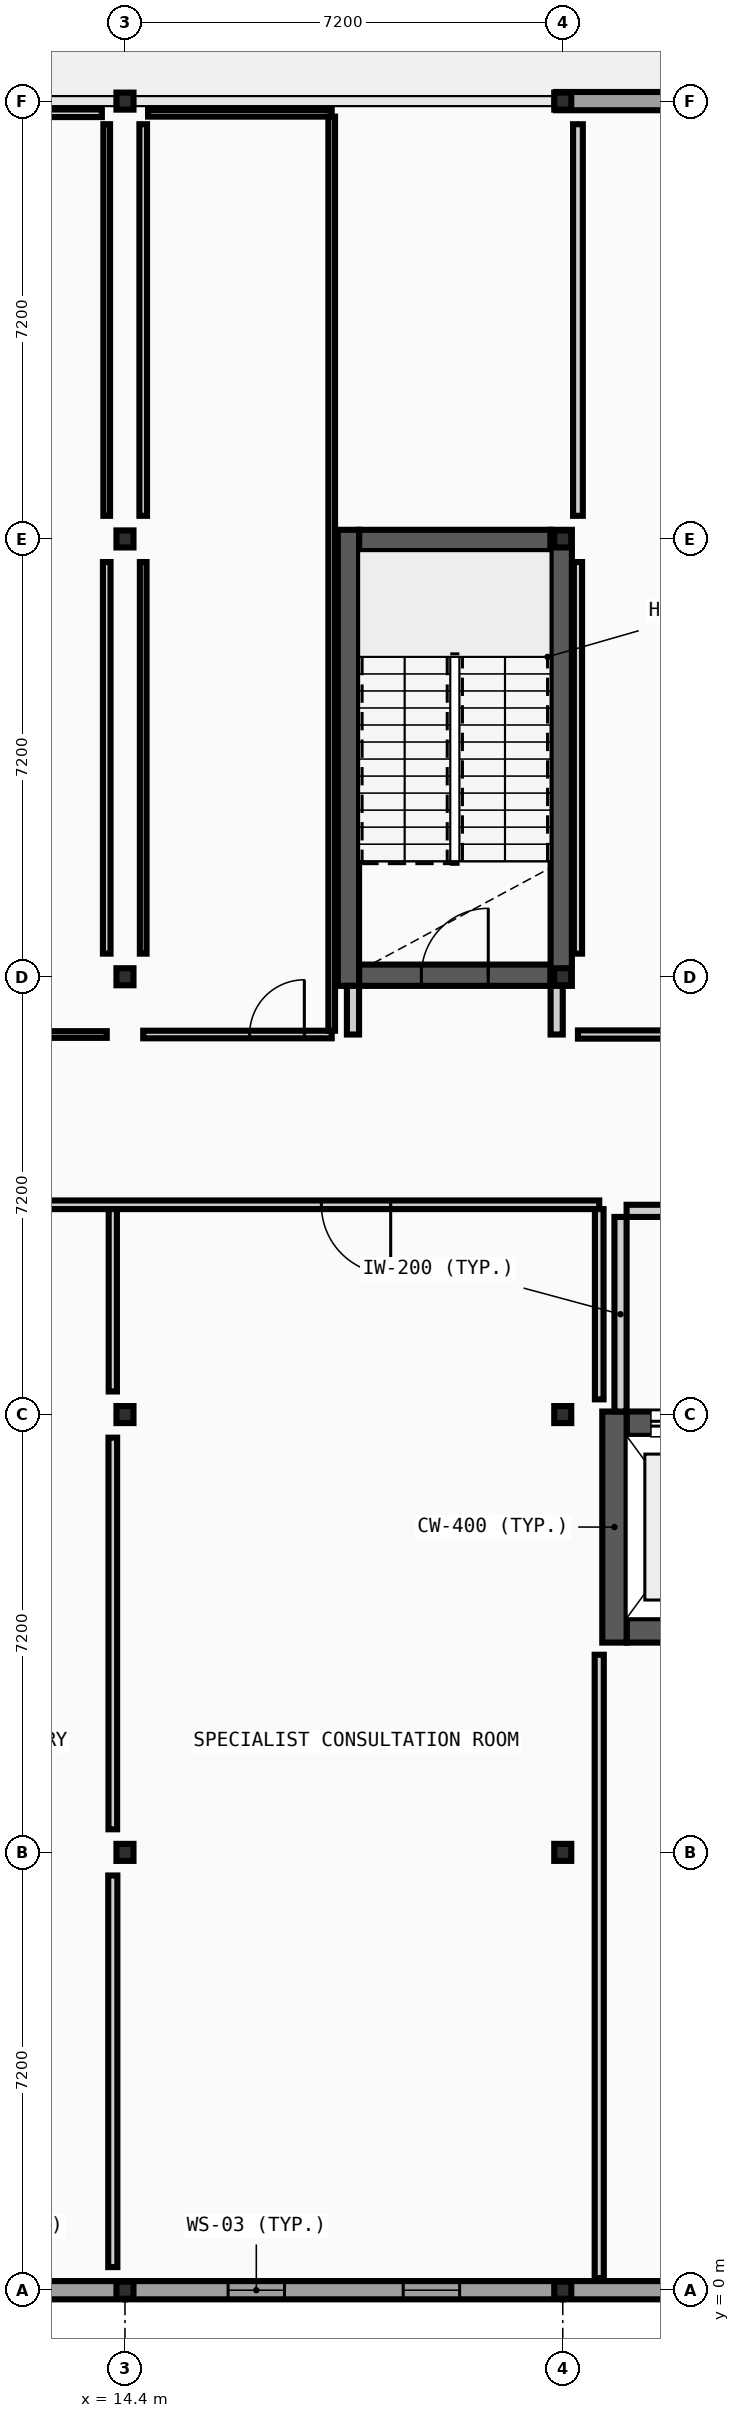
"""IFC4 building model, lengths in metres.
Left out: names, types, materials, properties, quantities, classifications, styles, units other than length and angle.
Written with IfcOpenShell. Run it as: python <this file> out.ifc"""

import sys

from ifc_helpers import new_model, si_unit, direction, frame, frame_2d, origin, origin_2d, place, context, subcontext, project, spatial, rectangle, i_section, extrude, element, fill, save


model = new_model("IFC4")
c1 = context("Model", 3, precision=1e-05, world=origin(), true_north=direction((0.0, 1.0)))
c2 = subcontext(c1, "Body", "Model", "MODEL_VIEW")
j1 = project(units=[si_unit("LENGTHUNIT", "METRE"), si_unit("PLANEANGLEUNIT", "RADIAN")], contexts=[c1])
p1 = place(None, origin())
s1 = spatial("IfcSite", under=j1, at=p1, CompositionType="ELEMENT")
p2 = place(p1, origin())
s2 = spatial("IfcBuilding", under=s1, at=p2, CompositionType="ELEMENT")
p3 = place(p2, frame((0.0, 0.0, 27.2)))
s3 = spatial("IfcBuildingStorey", under=s2, at=p3, CompositionType="ELEMENT", Elevation=27.2)
for number, where, z_axis, x_axis in (
    (1, (14.4, 0.0, 0.0), (0.0, 0.0, 1.0), (1.0, 0.0, 0.0)),
    (2, (14.4, 7.2, 0.0), (0.0, 0.0, 1.0), (1.0, 0.0, 0.0)),
    (3, (14.4, 14.4, 0.0), (0.0, 0.0, 1.0), (1.0, 0.0, 0.0)),
    (4, (14.4, 21.6, 0.0), (0.0, 0.0, 1.0), (1.0, 0.0, 0.0)),
    (5, (14.4, 28.8, 0.0), (0.0, 0.0, 1.0), (1.0, 0.0, 0.0)),
    (6, (14.4, 36.0, 0.0), (0.0, 0.0, 1.0), (1.0, 0.0, 0.0)),
    (7, (21.6, 0.0, 0.0), (0.0, 0.0, 1.0), (1.0, 0.0, 0.0)),
    (8, (21.6, 7.2, 0.0), (0.0, 0.0, 1.0), (1.0, 0.0, 0.0)),
    (9, (21.6, 14.4, 0.0), (0.0, 0.0, 1.0), (1.0, 0.0, 0.0)),
    (10, (21.6, 21.6, 0.0), (0.0, 0.0, 1.0), (1.0, 0.0, 0.0)),
    (11, (21.6, 28.8, 0.0), (0.0, 0.0, 1.0), (1.0, 0.0, 0.0)),
    (12, (21.6, 36.0, 0.0), (0.0, 0.0, 1.0), (1.0, 0.0, 0.0)),
):
    element("IfcColumn", number, at=place(p3, frame(where, z_axis=z_axis, x_axis=x_axis)), inside=s3, PredefinedType="COLUMN", context=c2, shape_type="SweptSolid", body=[
        extrude(i_section(OverallWidth=0.28, OverallDepth=0.28, WebThickness=0.01, FlangeThickness=0.018, FilletRadius=0.024, at=origin_2d()), origin(), (0.0, 0.0, 1.0), 4.4),
    ])
p4 = place(p3, frame((7.2, 0.0, 0.0), z_axis=(0.0, 0.0, 1.0), x_axis=(1.0, 0.0, 0.0)))
e13 = element("IfcWall", 13, at=p4, inside=s3, PredefinedType="STANDARD", context=c2, shape_type="SweptSolid", body=[
    extrude(rectangle(XDim=7.2, YDim=0.3, at=frame_2d((3.6, 0.0))), origin(), (0.0, 0.0, 1.0), 4.035),
])
p5 = place(p4, frame((4.593, 0.0, 0.95)))
e14 = element("IfcOpeningElement", 14, at=p5, cuts=e13, PredefinedType="OPENING", context=c2, shape_type="SweptSolid", body=[
    extrude(rectangle(XDim=0.894, YDim=1.26, at=frame_2d((0.447, 0.63))), frame((0.0, 0.16, 0.0), z_axis=(0.0, -1.0, 0.0), x_axis=(1.0, 0.0, 0.0)), (0.0, 0.0, 1.0), 0.32),
])
p6 = place(p3, frame((14.4, 0.0, 0.0), z_axis=(0.0, 0.0, 1.0), x_axis=(1.0, 0.0, 0.0)))
e15 = element("IfcWall", 15, at=p6, inside=s3, PredefinedType="STANDARD", context=c2, shape_type="SweptSolid", body=[
    extrude(rectangle(XDim=7.2, YDim=0.3, at=frame_2d((3.6, 0.0))), origin(), (0.0, 0.0, 1.0), 4.035),
])
p7 = place(p6, frame((1.696, 0.0, 0.95)))
e16 = element("IfcOpeningElement", 16, at=p7, cuts=e15, PredefinedType="OPENING", context=c2, shape_type="SweptSolid", body=[
    extrude(rectangle(XDim=0.928, YDim=1.26, at=frame_2d((0.464, 0.63))), frame((0.0, 0.16, 0.0), z_axis=(0.0, -1.0, 0.0), x_axis=(1.0, 0.0, 0.0)), (0.0, 0.0, 1.0), 0.32),
])
p8 = place(p6, frame((4.576, 0.0, 0.95)))
e17 = element("IfcOpeningElement", 17, at=p8, cuts=e15, PredefinedType="OPENING", context=c2, shape_type="SweptSolid", body=[
    extrude(rectangle(XDim=0.928, YDim=1.26, at=frame_2d((0.464, 0.63))), frame((0.0, 0.16, 0.0), z_axis=(0.0, -1.0, 0.0), x_axis=(1.0, 0.0, 0.0)), (0.0, 0.0, 1.0), 0.32),
])
p9 = place(p3, frame((21.6, 0.0, 0.0), z_axis=(0.0, 0.0, 1.0), x_axis=(1.0, 0.0, 0.0)))
e18 = element("IfcWall", 18, at=p9, inside=s3, PredefinedType="STANDARD", context=c2, shape_type="SweptSolid", body=[
    extrude(rectangle(XDim=7.05, YDim=0.3, at=frame_2d((3.525, 0.0))), origin(), (0.0, 0.0, 1.0), 4.035),
])
p10 = place(p9, frame((1.634, 0.0, 0.95)))
e19 = element("IfcOpeningElement", 19, at=p10, cuts=e18, PredefinedType="OPENING", context=c2, shape_type="SweptSolid", body=[
    extrude(rectangle(XDim=0.962, YDim=1.26, at=frame_2d((0.481, 0.63))), frame((0.0, 0.16, 0.0), z_axis=(0.0, -1.0, 0.0), x_axis=(1.0, 0.0, 0.0)), (0.0, 0.0, 1.0), 0.32),
])
p11 = place(p9, frame((4.454, 0.0, 0.95)))
e20 = element("IfcOpeningElement", 20, at=p11, cuts=e18, PredefinedType="OPENING", context=c2, shape_type="SweptSolid", body=[
    extrude(rectangle(XDim=0.962, YDim=1.26, at=frame_2d((0.481, 0.63))), frame((0.0, 0.16, 0.0), z_axis=(0.0, -1.0, 0.0), x_axis=(1.0, 0.0, 0.0)), (0.0, 0.0, 1.0), 0.32),
])
p12 = place(p3, frame((28.8, 36.0, 0.0), z_axis=(0.0, 0.0, 1.0), x_axis=(-1.0, 0.0, 0.0)))
e21 = element("IfcWall", 21, at=p12, inside=s3, PredefinedType="STANDARD", context=c2, shape_type="SweptSolid", body=[
    extrude(rectangle(XDim=7.31, YDim=0.3, at=frame_2d((3.655, 0.0))), origin(), (0.0, 0.0, 1.0), 4.035),
])
p13 = place(p12, frame((1.062, 0.0, 0.0)))
e22 = element("IfcOpeningElement", 22, at=p13, cuts=e21, PredefinedType="OPENING", context=c2, shape_type="SweptSolid", body=[
    extrude(rectangle(XDim=1.6, YDim=2.2, at=frame_2d((0.8, 1.1))), frame((0.0, 0.16, 0.0), z_axis=(0.0, -1.0, 0.0), x_axis=(1.0, 0.0, 0.0)), (0.0, 0.0, 1.0), 0.32),
])
p14 = place(p3, frame((22.65, 10.85, 0.0), z_axis=(0.0, 0.0, 1.0), x_axis=(1.0, 0.0, 0.0)))
e23 = element("IfcWall", 23, at=p14, inside=s3, PredefinedType="SHEAR", context=c2, shape_type="SweptSolid", body=[
    extrude(rectangle(XDim=2.2, YDim=0.4, at=frame_2d((1.1, 0.0))), origin(), (0.0, 0.0, 1.0), 4.18),
])
p15 = place(p3, frame((22.65, 14.25, 0.0), z_axis=(0.0, 0.0, 1.0), x_axis=(1.0, 0.0, 0.0)))
e24 = element("IfcWall", 24, at=p15, inside=s3, PredefinedType="SHEAR", context=c2, shape_type="SweptSolid", body=[
    extrude(rectangle(XDim=2.2, YDim=0.4, at=frame_2d((1.1, 0.0))), origin(), (0.0, 0.0, 1.0), 4.18),
])
p16 = place(p15, frame((0.4, 0.0, 0.0)))
e25 = element("IfcOpeningElement", 25, at=p16, cuts=e24, PredefinedType="OPENING", context=c2, shape_type="SweptSolid", body=[
    extrude(rectangle(XDim=1.4, YDim=2.2, at=frame_2d((0.7, 1.1))), frame((0.0, 0.21, 0.0), z_axis=(0.0, -1.0, 0.0), x_axis=(1.0, 0.0, 0.0)), (0.0, 0.0, 1.0), 0.42),
])
p17 = place(p3, frame((22.45, 10.65, 0.0), z_axis=(0.0, 0.0, 1.0), x_axis=(0.0, 1.0, 0.0)))
e26 = element("IfcWall", 26, at=p17, inside=s3, PredefinedType="SHEAR", context=c2, shape_type="SweptSolid", body=[
    extrude(rectangle(XDim=3.8, YDim=0.4, at=frame_2d((1.9, 0.0))), origin(), (0.0, 0.0, 1.0), 4.18),
])
p18 = place(p3, frame((22.65, 17.75, 0.0), z_axis=(0.0, 0.0, 1.0), x_axis=(1.0, 0.0, 0.0)))
e27 = element("IfcWall", 27, at=p18, inside=s3, PredefinedType="PARTITIONING", context=c2, shape_type="SweptSolid", body=[
    extrude(rectangle(XDim=5.75, YDim=0.2, at=frame_2d((2.875, 0.0))), origin(), (0.0, 0.0, 1.0), 4.18),
])
p19 = place(p18, frame((2.075, 0.0, 0.0)))
e28 = element("IfcOpeningElement", 28, at=p19, cuts=e27, PredefinedType="OPENING", context=c2, shape_type="SweptSolid", body=[
    extrude(rectangle(XDim=1.6, YDim=2.2, at=frame_2d((0.8, 1.1))), frame((0.0, 0.11, 0.0), z_axis=(0.0, -1.0, 0.0), x_axis=(1.0, 0.0, 0.0)), (0.0, 0.0, 1.0), 0.22),
])
p20 = place(p3, frame((22.55, 14.45, 0.0), z_axis=(0.0, 0.0, 1.0), x_axis=(0.0, 1.0, 0.0)))
e29 = element("IfcWall", 29, at=p20, inside=s3, PredefinedType="PARTITIONING", context=c2, shape_type="SweptSolid", body=[
    extrude(rectangle(XDim=3.2, YDim=0.2, at=frame_2d((1.6, 0.0))), origin(), (0.0, 0.0, 1.0), 4.18),
])
p21 = place(p3, frame((18.25, 21.625, 0.0), z_axis=(0.0, 0.0, 1.0), x_axis=(1.0, 0.0, 0.0)))
e30 = element("IfcWall", 30, at=p21, inside=s3, PredefinedType="SHEAR", context=c2, shape_type="SweptSolid", body=[
    extrude(rectangle(XDim=3.15, YDim=0.35, at=frame_2d((1.575, 0.0))), origin(), (0.0, 0.0, 1.0), 4.2),
])
p22 = place(p21, frame((1.025, 0.0, 0.0)))
e31 = element("IfcOpeningElement", 31, at=p22, cuts=e30, PredefinedType="OPENING", context=c2, shape_type="SweptSolid", body=[
    extrude(rectangle(XDim=1.1, YDim=2.15, at=frame_2d((0.55, 1.075))), frame((0.0, 0.185, 0.0), z_axis=(0.0, -1.0, 0.0), x_axis=(1.0, 0.0, 0.0)), (0.0, 0.0, 1.0), 0.37),
])
p23 = place(p3, frame((18.25, 28.775, 0.0), z_axis=(0.0, 0.0, 1.0), x_axis=(1.0, 0.0, 0.0)))
e32 = element("IfcWall", 32, at=p23, inside=s3, PredefinedType="SHEAR", context=c2, shape_type="SweptSolid", body=[
    extrude(rectangle(XDim=3.15, YDim=0.35, at=frame_2d((1.575, 0.0))), origin(), (0.0, 0.0, 1.0), 4.2),
])
for number, where, z_axis, x_axis in (
    (33, (18.075, 21.45, 0.0), (0.0, 0.0, 1.0), (0.0, 1.0, 0.0)),
    (34, (21.575, 21.45, 0.0), (0.0, 0.0, 1.0), (0.0, 1.0, 0.0)),
):
    element("IfcWall", number, at=place(p3, frame(where, z_axis=z_axis, x_axis=x_axis)), inside=s3, PredefinedType="SHEAR", context=c2, shape_type="SweptSolid", body=[
        extrude(rectangle(XDim=7.5, YDim=0.35, at=frame_2d((3.75, 0.0))), origin(), (0.0, 0.0, 1.0), 4.2),
    ])
for number, where, z_axis, x_axis in (
    (35, (18.15, 20.65, 0.0), (0.0, 0.0, 1.0), (0.0, 1.0, 0.0)),
    (36, (21.5, 20.65, 0.0), (0.0, 0.0, 1.0), (0.0, 1.0, 0.0)),
):
    element("IfcWall", number, at=place(p3, frame(where, z_axis=z_axis, x_axis=x_axis)), inside=s3, PredefinedType="PARTITIONING", context=c2, shape_type="SweptSolid", body=[
        extrude(rectangle(XDim=0.8, YDim=0.2, at=frame_2d((0.4, 0.0))), origin(), (0.0, 0.0, 1.0), 3.85),
    ])
p24 = place(p3, frame((9.45, 17.85, 0.0), z_axis=(0.0, 0.0, 1.0), x_axis=(1.0, 0.0, 0.0)))
e37 = element("IfcWall", 37, at=p24, inside=s3, PredefinedType="PARTITIONING", context=c2, shape_type="SweptSolid", body=[
    extrude(rectangle(XDim=12.75, YDim=0.142, at=frame_2d((6.375, 0.0))), origin(), (0.0, 0.0, 1.0), 4.18),
])
p25 = place(p24, frame((0.45, 0.0, 0.0)))
e38 = element("IfcOpeningElement", 38, at=p25, cuts=e37, PredefinedType="OPENING", context=c2, shape_type="SweptSolid", body=[
    extrude(rectangle(XDim=1.8, YDim=2.3, at=frame_2d((0.9, 1.15))), frame((0.0, 0.081, 0.0), z_axis=(0.0, -1.0, 0.0), x_axis=(1.0, 0.0, 0.0)), (0.0, 0.0, 1.0), 0.162),
])
p26 = place(p24, frame((8.18, 0.0, 0.0)))
e39 = element("IfcOpeningElement", 39, at=p26, cuts=e37, PredefinedType="OPENING", context=c2, shape_type="SweptSolid", body=[
    extrude(rectangle(XDim=1.14, YDim=2.096, at=frame_2d((0.57, 1.048))), frame((0.0, 0.081, 0.0), z_axis=(0.0, -1.0, 0.0), x_axis=(1.0, 0.0, 0.0)), (0.0, 0.0, 1.0), 0.162),
])
p27 = place(p3, frame((11.0, 20.65, 0.0), z_axis=(0.0, 0.0, 1.0), x_axis=(1.0, 0.0, 0.0)))
e40 = element("IfcWall", 40, at=p27, inside=s3, PredefinedType="PARTITIONING", context=c2, shape_type="SweptSolid", body=[
    extrude(rectangle(XDim=3.1, YDim=0.11, at=frame_2d((1.55, 0.0))), origin(), (0.0, 0.0, 1.0), 4.18),
])
p28 = place(p27, frame((0.45, 0.0, 0.0)))
e41 = element("IfcOpeningElement", 41, at=p28, cuts=e40, PredefinedType="OPENING", context=c2, shape_type="SweptSolid", body=[
    extrude(rectangle(XDim=1.0, YDim=2.1, at=frame_2d((0.5, 1.05))), frame((0.0, 0.065, 0.0), z_axis=(0.0, -1.0, 0.0), x_axis=(1.0, 0.0, 0.0)), (0.0, 0.0, 1.0), 0.13),
])
p29 = place(p3, frame((14.7, 20.65, 0.0), z_axis=(0.0, 0.0, 1.0), x_axis=(1.0, 0.0, 0.0)))
e42 = element("IfcWall", 42, at=p29, inside=s3, PredefinedType="PARTITIONING", context=c2, shape_type="SweptSolid", body=[
    extrude(rectangle(XDim=3.1, YDim=0.125, at=frame_2d((1.55, 0.0))), origin(), (0.0, 0.0, 1.0), 4.18),
])
p30 = place(p29, frame((1.75, 0.0, 0.0)))
e43 = element("IfcOpeningElement", 43, at=p30, cuts=e42, PredefinedType="OPENING", context=c2, shape_type="SweptSolid", body=[
    extrude(rectangle(XDim=0.9, YDim=2.1, at=frame_2d((0.45, 1.05))), frame((0.0, 0.073, 0.0), z_axis=(0.0, -1.0, 0.0), x_axis=(1.0, 0.0, 0.0)), (0.0, 0.0, 1.0), 0.145),
])
p31 = place(p3, frame((21.85, 20.65, 0.0), z_axis=(0.0, 0.0, 1.0), x_axis=(1.0, 0.0, 0.0)))
e44 = element("IfcWall", 44, at=p31, inside=s3, PredefinedType="PARTITIONING", context=c2, shape_type="SweptSolid", body=[
    extrude(rectangle(XDim=6.75, YDim=0.135, at=frame_2d((3.375, 0.0))), origin(), (0.0, 0.0, 1.0), 4.18),
])
p32 = place(p31, frame((2.818, 0.0, 0.0)))
e45 = element("IfcOpeningElement", 45, at=p32, cuts=e44, PredefinedType="OPENING", context=c2, shape_type="SweptSolid", body=[
    extrude(rectangle(XDim=1.114, YDim=2.096, at=frame_2d((0.557, 1.048))), frame((0.0, 0.078, 0.0), z_axis=(0.0, -1.0, 0.0), x_axis=(1.0, 0.0, 0.0)), (0.0, 0.0, 1.0), 0.155),
])
p33 = place(p3, frame((11.0, 35.8, 0.0), z_axis=(0.0, 0.0, 1.0), x_axis=(1.0, 0.0, 0.0)))
e46 = element("IfcWall", 46, at=p33, inside=s3, PredefinedType="PARTITIONING", context=c2, shape_type="SweptSolid", body=[
    extrude(rectangle(XDim=3.02, YDim=0.125, at=frame_2d((1.51, 0.0))), origin(), (0.0, 0.0, 1.0), 4.035),
])
p34 = place(p3, frame((14.78, 35.8, 0.0), z_axis=(0.0, 0.0, 1.0), x_axis=(1.0, 0.0, 0.0)))
e47 = element("IfcWall", 47, at=p34, inside=s3, PredefinedType="PARTITIONING", context=c2, shape_type="SweptSolid", body=[
    extrude(rectangle(XDim=3.02, YDim=0.11, at=frame_2d((1.51, 0.0))), origin(), (0.0, 0.0, 1.0), 4.035),
])
p35 = place(p3, frame((14.1, 21.98, 0.0), z_axis=(0.0, 0.0, 1.0), x_axis=(0.0, 1.0, 0.0)))
e48 = element("IfcWall", 48, at=p35, inside=s3, PredefinedType="PARTITIONING", context=c2, shape_type="SweptSolid", body=[
    extrude(rectangle(XDim=6.44, YDim=0.125, at=frame_2d((3.22, 0.0))), origin(), (0.0, 0.0, 1.0), 4.18),
])
p36 = place(p3, frame((14.1, 29.18, 0.0), z_axis=(0.0, 0.0, 1.0), x_axis=(0.0, 1.0, 0.0)))
e49 = element("IfcWall", 49, at=p36, inside=s3, PredefinedType="PARTITIONING", context=c2, shape_type="SweptSolid", body=[
    extrude(rectangle(XDim=6.44, YDim=0.11, at=frame_2d((3.22, 0.0))), origin(), (0.0, 0.0, 1.0), 4.18),
])
p37 = place(p3, frame((14.2, 0.38, 0.0), z_axis=(0.0, 0.0, 1.0), x_axis=(0.0, 1.0, 0.0)))
e50 = element("IfcWall", 50, at=p37, inside=s3, PredefinedType="PARTITIONING", context=c2, shape_type="SweptSolid", body=[
    extrude(rectangle(XDim=6.44, YDim=0.15, at=frame_2d((3.22, 0.0))), origin(), (0.0, 0.0, 1.0), 4.18),
])
p38 = place(p3, frame((14.2, 7.58, 0.0), z_axis=(0.0, 0.0, 1.0), x_axis=(0.0, 1.0, 0.0)))
e51 = element("IfcWall", 51, at=p38, inside=s3, PredefinedType="PARTITIONING", context=c2, shape_type="SweptSolid", body=[
    extrude(rectangle(XDim=6.44, YDim=0.142, at=frame_2d((3.22, 0.0))), origin(), (0.0, 0.0, 1.0), 4.18),
])
p39 = place(p3, frame((14.2, 14.78, 0.0), z_axis=(0.0, 0.0, 1.0), x_axis=(0.0, 1.0, 0.0)))
e52 = element("IfcWall", 52, at=p39, inside=s3, PredefinedType="PARTITIONING", context=c2, shape_type="SweptSolid", body=[
    extrude(rectangle(XDim=2.999, YDim=0.135, at=frame_2d((1.5, 0.0))), origin(), (0.0, 0.0, 1.0), 4.18),
])
p40 = place(p3, frame((14.7, 21.98, 0.0), z_axis=(0.0, 0.0, 1.0), x_axis=(0.0, 1.0, 0.0)))
e53 = element("IfcWall", 53, at=p40, inside=s3, PredefinedType="PARTITIONING", context=c2, shape_type="SweptSolid", body=[
    extrude(rectangle(XDim=6.44, YDim=0.11, at=frame_2d((3.22, 0.0))), origin(), (0.0, 0.0, 1.0), 4.18),
])
p41 = place(p3, frame((14.7, 29.18, 0.0), z_axis=(0.0, 0.0, 1.0), x_axis=(0.0, 1.0, 0.0)))
e54 = element("IfcWall", 54, at=p41, inside=s3, PredefinedType="PARTITIONING", context=c2, shape_type="SweptSolid", body=[
    extrude(rectangle(XDim=6.44, YDim=0.125, at=frame_2d((3.22, 0.0))), origin(), (0.0, 0.0, 1.0), 4.18),
])
p42 = place(p3, frame((17.8, 20.712, 0.0), z_axis=(0.0, 0.0, 1.0), x_axis=(0.0, 1.0, 0.0)))
e55 = element("IfcWall", 55, at=p42, inside=s3, PredefinedType="PARTITIONING", context=c2, shape_type="SweptSolid", body=[
    extrude(rectangle(XDim=15.033, YDim=0.11, at=frame_2d((7.516, 0.0))), origin(), (0.0, 0.0, 1.0), 4.18),
])
p43 = place(p3, frame((21.85, 21.98, 0.0), z_axis=(0.0, 0.0, 1.0), x_axis=(0.0, 1.0, 0.0)))
e56 = element("IfcWall", 56, at=p43, inside=s3, PredefinedType="PARTITIONING", context=c2, shape_type="SweptSolid", body=[
    extrude(rectangle(XDim=6.44, YDim=0.135, at=frame_2d((3.22, 0.0))), origin(), (0.0, 0.0, 1.0), 4.18),
])
p44 = place(p3, frame((21.85, 29.18, 0.0), z_axis=(0.0, 0.0, 1.0), x_axis=(0.0, 1.0, 0.0)))
e57 = element("IfcWall", 57, at=p44, inside=s3, PredefinedType="PARTITIONING", context=c2, shape_type="SweptSolid", body=[
    extrude(rectangle(XDim=6.44, YDim=0.16, at=frame_2d((3.22, 0.0))), origin(), (0.0, 0.0, 1.0), 4.18),
])
p45 = place(p3, frame((22.2, 0.2, 0.0), z_axis=(0.0, 0.0, 1.0), x_axis=(0.0, 1.0, 0.0)))
e58 = element("IfcWall", 58, at=p45, inside=s3, PredefinedType="PARTITIONING", context=c2, shape_type="SweptSolid", body=[
    extrude(rectangle(XDim=10.25, YDim=0.15, at=frame_2d((5.125, 0.0))), origin(), (0.0, 0.0, 1.0), 4.18),
])
p46 = place(p3, frame((22.2, 14.65, 0.0), z_axis=(0.0, 0.0, 1.0), x_axis=(0.0, 1.0, 0.0)))
e59 = element("IfcWall", 59, at=p46, inside=s3, PredefinedType="PARTITIONING", context=c2, shape_type="SweptSolid", body=[
    extrude(rectangle(XDim=3.129, YDim=0.142, at=frame_2d((1.564, 0.0))), origin(), (0.0, 0.0, 1.0), 4.18),
])
p47 = place(p7, origin())
e60 = element("IfcWindow", 60, at=p47, inside=s3, PartitioningType="SINGLE_PANEL", PredefinedType="WINDOW", context=c2, shape_type="SweptSolid", body=[
    extrude(rectangle(XDim=0.928, YDim=1.26, at=frame_2d((0.464, 0.63))), frame((0.0, 0.03, 0.0), z_axis=(0.0, -1.0, 0.0), x_axis=(1.0, 0.0, 0.0)), (0.0, 0.0, 1.0), 0.06),
])
fill(e16, e60)
p48 = place(p8, origin())
e61 = element("IfcWindow", 61, at=p48, inside=s3, PartitioningType="SINGLE_PANEL", PredefinedType="WINDOW", context=c2, shape_type="SweptSolid", body=[
    extrude(rectangle(XDim=0.928, YDim=1.26, at=frame_2d((0.464, 0.63))), frame((0.0, 0.03, 0.0), z_axis=(0.0, -1.0, 0.0), x_axis=(1.0, 0.0, 0.0)), (0.0, 0.0, 1.0), 0.06),
])
fill(e17, e61)
p49 = place(p16, origin())
e62 = element("IfcDoor", 62, at=p49, inside=s3, OperationType="SLIDING_TO_LEFT", PredefinedType="DOOR", context=c2, shape_type="SweptSolid", body=[
    extrude(rectangle(XDim=1.4, YDim=2.2, at=frame_2d((0.7, 1.1))), frame((0.0, 0.025, 0.0), z_axis=(0.0, -1.0, 0.0), x_axis=(1.0, 0.0, 0.0)), (0.0, 0.0, 1.0), 0.05),
])
fill(e25, e62)
p50 = place(p22, frame((1.1, 0.0, 0.0), z_axis=(0.0, 0.0, 1.0), x_axis=(-1.0, 0.0, 0.0)))
e63 = element("IfcDoor", 63, at=p50, inside=s3, OperationType="SINGLE_SWING_RIGHT", PredefinedType="DOOR", context=c2, shape_type="SweptSolid", body=[
    extrude(rectangle(XDim=1.1, YDim=2.15, at=frame_2d((0.55, 1.075))), frame((0.0, 0.025, 0.0), z_axis=(0.0, -1.0, 0.0), x_axis=(1.0, 0.0, 0.0)), (0.0, 0.0, 1.0), 0.05),
])
fill(e31, e63)
p51 = place(p30, frame((0.9, 0.0, 0.0), z_axis=(0.0, 0.0, 1.0), x_axis=(-1.0, 0.0, 0.0)))
e64 = element("IfcDoor", 64, at=p51, inside=s3, OperationType="SINGLE_SWING_RIGHT", PredefinedType="DOOR", context=c2, shape_type="SweptSolid", body=[
    extrude(rectangle(XDim=0.9, YDim=2.1, at=frame_2d((0.45, 1.05))), frame((0.0, 0.025, 0.0), z_axis=(0.0, -1.0, 0.0), x_axis=(1.0, 0.0, 0.0)), (0.0, 0.0, 1.0), 0.05),
])
fill(e43, e64)
p52 = place(p26, origin())
e65 = element("IfcDoor", 65, at=p52, inside=s3, OperationType="SINGLE_SWING_RIGHT", PredefinedType="DOOR", context=c2, shape_type="SweptSolid", body=[
    extrude(rectangle(XDim=1.14, YDim=2.096, at=frame_2d((0.57, 1.048))), frame((0.0, 0.025, 0.0), z_axis=(0.0, -1.0, 0.0), x_axis=(1.0, 0.0, 0.0)), (0.0, 0.0, 1.0), 0.05),
])
fill(e39, e65)
save(model, sys.argv[1])
